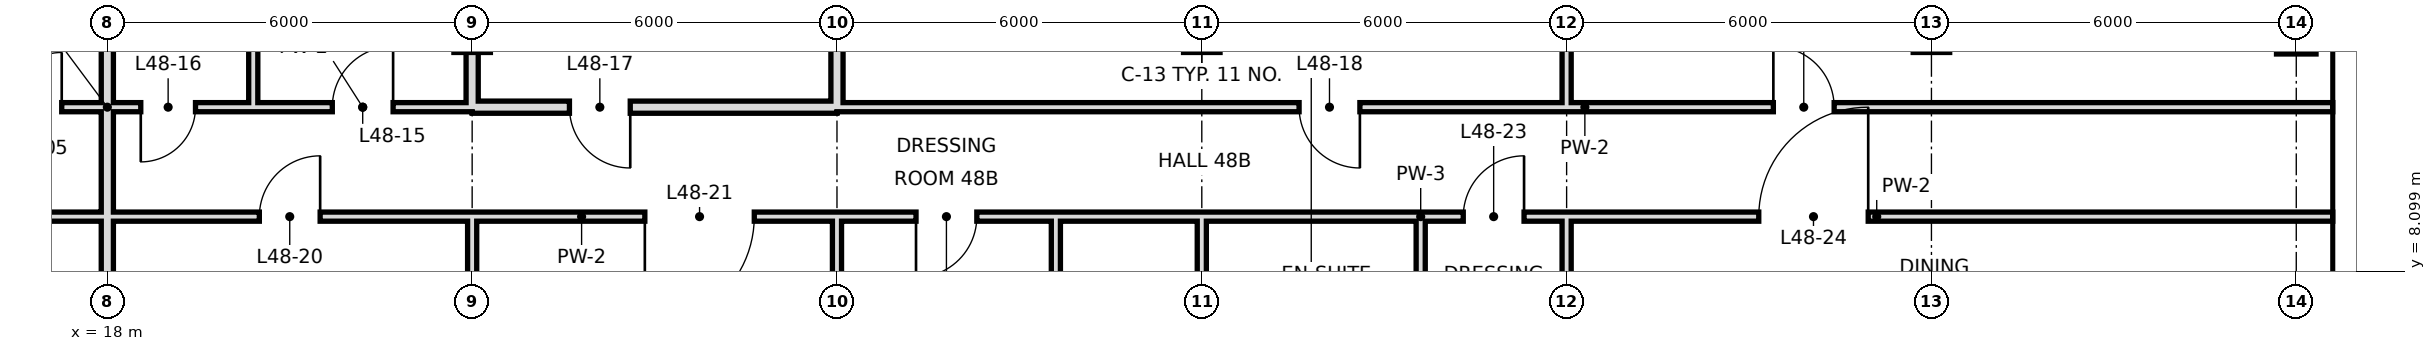
"""IFC4 building model, lengths in metres.
Left out: names, types, materials, properties, quantities, classifications, styles, units other than length and angle.
Written with IfcOpenShell. Run it as: python <this file> out.ifc"""

import sys

from ifc_helpers import new_model, si_unit, direction, frame, frame_2d, origin, origin_2d, place, context, subcontext, project, spatial, rectangle, hollow_rectangle, extrude, element, fill, save


model = new_model("IFC4")
c1 = context("Model", 3, precision=1e-05, world=origin(), true_north=direction((0.0, 1.0)))
c2 = subcontext(c1, "Body", "Model", "MODEL_VIEW")
j1 = project(units=[si_unit("LENGTHUNIT", "METRE"), si_unit("PLANEANGLEUNIT", "RADIAN")], contexts=[c1])
p1 = place(None, origin())
s1 = spatial("IfcSite", under=j1, at=p1, CompositionType="ELEMENT")
p2 = place(p1, origin())
s2 = spatial("IfcBuilding", under=s1, at=p2, CompositionType="ELEMENT")
p3 = place(p2, frame((0.0, 0.0, 206.4)))
s3 = spatial("IfcBuildingStorey", under=s2, at=p3, CompositionType="ELEMENT", Elevation=206.4)
p4 = place(p3, frame((54.0, 12.0, 0.0), z_axis=(0.0, 0.0, 1.0), x_axis=(1.0, 0.0, 0.0)))
e1 = element("IfcColumn", 1, at=p4, inside=s3, PredefinedType="COLUMN", context=c2, shape_type="SweptSolid", body=[
    extrude(hollow_rectangle(XDim=0.65, YDim=0.65, WallThickness=0.032, at=origin_2d()), origin(), (0.0, 0.0, 1.0), 3.6),
])
p5 = place(p3, frame((18.0, -0.6, 0.0), z_axis=(0.0, 0.0, 1.0), x_axis=(0.0, 1.0, 0.0)))
e2 = element("IfcWall", 2, at=p5, inside=s3, PredefinedType="SOLIDWALL", context=c2, shape_type="SweptSolid", body=[
    extrude(rectangle(XDim=15.9, YDim=0.2, at=frame_2d((7.95, 0.0))), origin(), (0.0, 0.0, 1.0), 2.68),
])
p6 = place(p3, frame((20.4, 10.8, 0.0), z_axis=(0.0, 0.0, 1.0), x_axis=(0.0, 1.0, 0.0)))
e3 = element("IfcWall", 3, at=p6, inside=s3, PredefinedType="PARTITIONING", context=c2, shape_type="SweptSolid", body=[
    extrude(rectangle(XDim=4.5, YDim=0.15, at=frame_2d((2.25, 0.0))), origin(), (0.0, 0.0, 1.0), 3.38),
])
p7 = place(p3, frame((24.0, 10.8, 0.0), z_axis=(0.0, 0.0, 1.0), x_axis=(0.0, 1.0, 0.0)))
e4 = element("IfcWall", 4, at=p7, inside=s3, PredefinedType="SOLIDWALL", context=c2, shape_type="SweptSolid", body=[
    extrude(rectangle(XDim=4.5, YDim=0.2, at=frame_2d((2.25, 0.0))), origin(), (0.0, 0.0, 1.0), 2.68),
])
p8 = place(p3, frame((24.0, 0.0, 0.0), z_axis=(0.0, 0.0, 1.0), x_axis=(0.0, 1.0, 0.0)))
e5 = element("IfcWall", 5, at=p8, inside=s3, PredefinedType="PARTITIONING", context=c2, shape_type="SweptSolid", body=[
    extrude(rectangle(XDim=9.0, YDim=0.15, at=frame_2d((4.5, 0.0))), origin(), (0.0, 0.0, 1.0), 2.68),
])
p9 = place(p3, frame((30.0, 10.8, 0.0), z_axis=(0.0, 0.0, 1.0), x_axis=(0.0, 1.0, 0.0)))
e6 = element("IfcWall", 6, at=p9, inside=s3, PredefinedType="SOLIDWALL", context=c2, shape_type="SweptSolid", body=[
    extrude(rectangle(XDim=4.5, YDim=0.2, at=frame_2d((2.25, 0.0))), origin(), (0.0, 0.0, 1.0), 2.68),
])
p10 = place(p3, frame((30.0, -0.6, 0.0), z_axis=(0.0, 0.0, 1.0), x_axis=(0.0, 1.0, 0.0)))
e7 = element("IfcWall", 7, at=p10, inside=s3, PredefinedType="PARTITIONING", context=c2, shape_type="SweptSolid", body=[
    extrude(rectangle(XDim=9.6, YDim=0.15, at=frame_2d((4.8, 0.0))), origin(), (0.0, 0.0, 1.0), 2.68),
])
p11 = place(p3, frame((33.6, 6.0, 0.0), z_axis=(0.0, 0.0, 1.0), x_axis=(0.0, 1.0, 0.0)))
e8 = element("IfcWall", 8, at=p11, inside=s3, PredefinedType="PARTITIONING", context=c2, shape_type="SweptSolid", body=[
    extrude(rectangle(XDim=3.0, YDim=0.15, at=frame_2d((1.5, 0.0))), origin(), (0.0, 0.0, 1.0), 3.38),
])
p12 = place(p3, frame((36.0, 6.0, 0.0), z_axis=(0.0, 0.0, 1.0), x_axis=(0.0, 1.0, 0.0)))
e9 = element("IfcWall", 9, at=p12, inside=s3, PredefinedType="PARTITIONING", context=c2, shape_type="SweptSolid", body=[
    extrude(rectangle(XDim=3.0, YDim=0.15, at=frame_2d((1.5, 0.0))), origin(), (0.0, 0.0, 1.0), 2.68),
])
p13 = place(p3, frame((39.6, 6.0, 0.0), z_axis=(0.0, 0.0, 1.0), x_axis=(0.0, 1.0, 0.0)))
e10 = element("IfcWall", 10, at=p13, inside=s3, PredefinedType="PARTITIONING", context=c2, shape_type="SweptSolid", body=[
    extrude(rectangle(XDim=3.0, YDim=0.15, at=frame_2d((1.5, 0.0))), origin(), (0.0, 0.0, 1.0), 3.38),
])
p14 = place(p3, frame((42.0, -0.6, 0.0), z_axis=(0.0, 0.0, 1.0), x_axis=(0.0, 1.0, 0.0)))
e11 = element("IfcWall", 11, at=p14, inside=s3, PredefinedType="PARTITIONING", context=c2, shape_type="SweptSolid", body=[
    extrude(rectangle(XDim=9.6, YDim=0.15, at=frame_2d((4.8, 0.0))), origin(), (0.0, 0.0, 1.0), 2.68),
])
p15 = place(p3, frame((42.0, 10.8, 0.0), z_axis=(0.0, 0.0, 1.0), x_axis=(0.0, 1.0, 0.0)))
e12 = element("IfcWall", 12, at=p15, inside=s3, PredefinedType="PARTITIONING", context=c2, shape_type="SweptSolid", body=[
    extrude(rectangle(XDim=4.5, YDim=0.15, at=frame_2d((2.25, 0.0))), origin(), (0.0, 0.0, 1.0), 2.68),
])
p16 = place(p3, frame((24.0, 10.8, 0.0), z_axis=(0.0, 0.0, 1.0), x_axis=(1.0, 0.0, 0.0)))
e13 = element("IfcWall", 13, at=p16, inside=s3, PredefinedType="SOLIDWALL", context=c2, shape_type="SweptSolid", body=[
    extrude(rectangle(XDim=6.0, YDim=0.2, at=frame_2d((3.0, 0.0))), origin(), (0.0, 0.0, 1.0), 2.68),
])
p17 = place(p16, frame((1.6, 0.0, 0.0)))
e14 = element("IfcOpeningElement", 14, at=p17, cuts=e13, PredefinedType="OPENING", context=c2, shape_type="SweptSolid", body=[
    extrude(rectangle(XDim=1.0, YDim=2.4, at=frame_2d((0.5, 1.2))), frame((0.0, 0.11, 0.0), z_axis=(0.0, -1.0, 0.0), x_axis=(1.0, 0.0, 0.0)), (0.0, 0.0, 1.0), 0.22),
])
p18 = place(p3, frame((20.4, 10.8, 0.0), z_axis=(0.0, 0.0, 1.0), x_axis=(1.0, 0.0, 0.0)))
e15 = element("IfcWall", 15, at=p18, inside=s3, PredefinedType="PARTITIONING", context=c2, shape_type="SweptSolid", body=[
    extrude(rectangle(XDim=3.6, YDim=0.15, at=frame_2d((1.8, 0.0))), origin(), (0.0, 0.0, 1.0), 3.38),
])
p19 = place(p18, frame((1.3, 0.0, 0.0)))
e16 = element("IfcOpeningElement", 16, at=p19, cuts=e15, PredefinedType="OPENING", context=c2, shape_type="SweptSolid", body=[
    extrude(rectangle(XDim=1.0, YDim=2.4, at=frame_2d((0.5, 1.2))), frame((0.0, 0.085, 0.0), z_axis=(0.0, -1.0, 0.0), x_axis=(1.0, 0.0, 0.0)), (0.0, 0.0, 1.0), 0.17),
])
p20 = place(p3, frame((30.0, 10.8, 0.0), z_axis=(0.0, 0.0, 1.0), x_axis=(1.0, 0.0, 0.0)))
e17 = element("IfcWall", 17, at=p20, inside=s3, PredefinedType="PARTITIONING", context=c2, shape_type="SweptSolid", body=[
    extrude(rectangle(XDim=24.6, YDim=0.15, at=frame_2d((12.3, 0.0))), origin(), (0.0, 0.0, 1.0), 3.38),
])
p21 = place(p20, frame((7.6, 0.0, 0.0)))
e18 = element("IfcOpeningElement", 18, at=p21, cuts=e17, PredefinedType="OPENING", context=c2, shape_type="SweptSolid", body=[
    extrude(rectangle(XDim=1.0, YDim=2.4, at=frame_2d((0.5, 1.2))), frame((0.0, 0.085, 0.0), z_axis=(0.0, -1.0, 0.0), x_axis=(1.0, 0.0, 0.0)), (0.0, 0.0, 1.0), 0.17),
])
p22 = place(p20, frame((15.4, 0.0, 0.0)))
e19 = element("IfcOpeningElement", 19, at=p22, cuts=e17, PredefinedType="OPENING", context=c2, shape_type="SweptSolid", body=[
    extrude(rectangle(XDim=1.0, YDim=2.4, at=frame_2d((0.5, 1.2))), frame((0.0, 0.085, 0.0), z_axis=(0.0, -1.0, 0.0), x_axis=(1.0, 0.0, 0.0)), (0.0, 0.0, 1.0), 0.17),
])
p23 = place(p3, frame((15.6, 10.8, 0.0), z_axis=(0.0, 0.0, 1.0), x_axis=(1.0, 0.0, 0.0)))
e20 = element("IfcWall", 20, at=p23, inside=s3, PredefinedType="PARTITIONING", context=c2, shape_type="SweptSolid", body=[
    extrude(rectangle(XDim=4.8, YDim=0.15, at=frame_2d((2.4, 0.0))), origin(), (0.0, 0.0, 1.0), 3.38),
])
p24 = place(p23, frame((0.75, 0.0, 0.0)))
e21 = element("IfcOpeningElement", 21, at=p24, cuts=e20, PredefinedType="OPENING", context=c2, shape_type="SweptSolid", body=[
    extrude(rectangle(XDim=0.9, YDim=2.4, at=frame_2d((0.45, 1.2))), frame((0.0, 0.085, 0.0), z_axis=(0.0, -1.0, 0.0), x_axis=(1.0, 0.0, 0.0)), (0.0, 0.0, 1.0), 0.17),
])
p25 = place(p23, frame((2.95, 0.0, 0.0)))
e22 = element("IfcOpeningElement", 22, at=p25, cuts=e20, PredefinedType="OPENING", context=c2, shape_type="SweptSolid", body=[
    extrude(rectangle(XDim=0.9, YDim=2.4, at=frame_2d((0.45, 1.2))), frame((0.0, 0.085, 0.0), z_axis=(0.0, -1.0, 0.0), x_axis=(1.0, 0.0, 0.0)), (0.0, 0.0, 1.0), 0.17),
])
p26 = place(p3, frame((18.0, 9.0, 0.0), z_axis=(0.0, 0.0, 1.0), x_axis=(1.0, 0.0, 0.0)))
e23 = element("IfcWall", 23, at=p26, inside=s3, PredefinedType="PARTITIONING", context=c2, shape_type="SweptSolid", body=[
    extrude(rectangle(XDim=15.6, YDim=0.15, at=frame_2d((7.8, 0.0))), origin(), (0.0, 0.0, 1.0), 3.38),
])
p27 = place(p26, frame((2.5, 0.0, 0.0)))
e24 = element("IfcOpeningElement", 24, at=p27, cuts=e23, PredefinedType="OPENING", context=c2, shape_type="SweptSolid", body=[
    extrude(rectangle(XDim=1.0, YDim=2.4, at=frame_2d((0.5, 1.2))), frame((0.0, 0.085, 0.0), z_axis=(0.0, -1.0, 0.0), x_axis=(1.0, 0.0, 0.0)), (0.0, 0.0, 1.0), 0.17),
])
p28 = place(p26, frame((8.84, 0.0, 0.0)))
e25 = element("IfcOpeningElement", 25, at=p28, cuts=e23, PredefinedType="OPENING", context=c2, shape_type="SweptSolid", body=[
    extrude(rectangle(XDim=1.8, YDim=2.4, at=frame_2d((0.9, 1.2))), frame((0.0, 0.085, 0.0), z_axis=(0.0, -1.0, 0.0), x_axis=(1.0, 0.0, 0.0)), (0.0, 0.0, 1.0), 0.17),
])
p29 = place(p26, frame((13.3, 0.0, 0.0)))
e26 = element("IfcOpeningElement", 26, at=p29, cuts=e23, PredefinedType="OPENING", context=c2, shape_type="SweptSolid", body=[
    extrude(rectangle(XDim=1.0, YDim=2.4, at=frame_2d((0.5, 1.2))), frame((0.0, 0.085, 0.0), z_axis=(0.0, -1.0, 0.0), x_axis=(1.0, 0.0, 0.0)), (0.0, 0.0, 1.0), 0.17),
])
p30 = place(p3, frame((39.6, 9.0, 0.0), z_axis=(0.0, 0.0, 1.0), x_axis=(1.0, 0.0, 0.0)))
e27 = element("IfcWall", 27, at=p30, inside=s3, PredefinedType="PARTITIONING", context=c2, shape_type="SweptSolid", body=[
    extrude(rectangle(XDim=15.0, YDim=0.15, at=frame_2d((7.5, 0.0))), origin(), (0.0, 0.0, 1.0), 3.38),
])
p31 = place(p30, frame((0.7, 0.0, 0.0)))
e28 = element("IfcOpeningElement", 28, at=p31, cuts=e27, PredefinedType="OPENING", context=c2, shape_type="SweptSolid", body=[
    extrude(rectangle(XDim=1.0, YDim=2.4, at=frame_2d((0.5, 1.2))), frame((0.0, 0.085, 0.0), z_axis=(0.0, -1.0, 0.0), x_axis=(1.0, 0.0, 0.0)), (0.0, 0.0, 1.0), 0.17),
])
p32 = place(p30, frame((5.56, 0.0, 0.0)))
e29 = element("IfcOpeningElement", 29, at=p32, cuts=e27, PredefinedType="OPENING", context=c2, shape_type="SweptSolid", body=[
    extrude(rectangle(XDim=1.8, YDim=2.4, at=frame_2d((0.9, 1.2))), frame((0.0, 0.085, 0.0), z_axis=(0.0, -1.0, 0.0), x_axis=(1.0, 0.0, 0.0)), (0.0, 0.0, 1.0), 0.17),
])
p33 = place(p3, frame((14.4, 9.0, 0.0), z_axis=(0.0, 0.0, 1.0), x_axis=(1.0, 0.0, 0.0)))
e30 = element("IfcWall", 30, at=p33, inside=s3, PredefinedType="PARTITIONING", context=c2, shape_type="SweptSolid", body=[
    extrude(rectangle(XDim=3.6, YDim=0.15, at=frame_2d((1.8, 0.0))), origin(), (0.0, 0.0, 1.0), 3.38),
])
p34 = place(p3, frame((33.6, 9.0, 0.0), z_axis=(0.0, 0.0, 1.0), x_axis=(1.0, 0.0, 0.0)))
e31 = element("IfcWall", 31, at=p34, inside=s3, PredefinedType="PARTITIONING", context=c2, shape_type="SweptSolid", body=[
    extrude(rectangle(XDim=6.0, YDim=0.15, at=frame_2d((3.0, 0.0))), origin(), (0.0, 0.0, 1.0), 3.38),
])
p35 = place(p24, frame((0.9, 0.0, 0.0), z_axis=(0.0, 0.0, 1.0), x_axis=(-1.0, 0.0, 0.0)))
e32 = element("IfcDoor", 32, at=p35, inside=s3, OperationType="SINGLE_SWING_LEFT", PredefinedType="DOOR", context=c2, shape_type="SweptSolid", body=[
    extrude(rectangle(XDim=0.9, YDim=2.4, at=frame_2d((0.45, 1.2))), frame((0.0, 0.025, 0.0), z_axis=(0.0, -1.0, 0.0), x_axis=(1.0, 0.0, 0.0)), (0.0, 0.0, 1.0), 0.05),
])
fill(e21, e32)
p36 = place(p19, frame((1.0, 0.0, 0.0), z_axis=(0.0, 0.0, 1.0), x_axis=(-1.0, 0.0, 0.0)))
e33 = element("IfcDoor", 33, at=p36, inside=s3, OperationType="SINGLE_SWING_LEFT", PredefinedType="DOOR", context=c2, shape_type="SweptSolid", body=[
    extrude(rectangle(XDim=1.0, YDim=2.4, at=frame_2d((0.5, 1.2))), frame((0.0, 0.025, 0.0), z_axis=(0.0, -1.0, 0.0), x_axis=(1.0, 0.0, 0.0)), (0.0, 0.0, 1.0), 0.05),
])
fill(e16, e33)
p37 = place(p25, frame((0.9, 0.0, 0.0), z_axis=(0.0, 0.0, 1.0), x_axis=(-1.0, 0.0, 0.0)))
e34 = element("IfcDoor", 34, at=p37, inside=s3, OperationType="SINGLE_SWING_RIGHT", PredefinedType="DOOR", context=c2, shape_type="SweptSolid", body=[
    extrude(rectangle(XDim=0.9, YDim=2.4, at=frame_2d((0.45, 1.2))), frame((0.0, 0.025, 0.0), z_axis=(0.0, -1.0, 0.0), x_axis=(1.0, 0.0, 0.0)), (0.0, 0.0, 1.0), 0.05),
])
fill(e22, e34)
p38 = place(p17, origin())
e35 = element("IfcDoor", 35, at=p38, inside=s3, OperationType="SINGLE_SWING_RIGHT", PredefinedType="DOOR", context=c2, shape_type="SweptSolid", body=[
    extrude(rectangle(XDim=1.0, YDim=2.4, at=frame_2d((0.5, 1.2))), frame((0.0, 0.025, 0.0), z_axis=(0.0, -1.0, 0.0), x_axis=(1.0, 0.0, 0.0)), (0.0, 0.0, 1.0), 0.05),
])
fill(e14, e35)
p39 = place(p21, origin())
e36 = element("IfcDoor", 36, at=p39, inside=s3, OperationType="SINGLE_SWING_RIGHT", PredefinedType="DOOR", context=c2, shape_type="SweptSolid", body=[
    extrude(rectangle(XDim=1.0, YDim=2.4, at=frame_2d((0.5, 1.2))), frame((0.0, 0.025, 0.0), z_axis=(0.0, -1.0, 0.0), x_axis=(1.0, 0.0, 0.0)), (0.0, 0.0, 1.0), 0.05),
])
fill(e18, e36)
p40 = place(p22, origin())
e37 = element("IfcDoor", 37, at=p40, inside=s3, OperationType="SINGLE_SWING_LEFT", PredefinedType="DOOR", context=c2, shape_type="SweptSolid", body=[
    extrude(rectangle(XDim=1.0, YDim=2.4, at=frame_2d((0.5, 1.2))), frame((0.0, 0.025, 0.0), z_axis=(0.0, -1.0, 0.0), x_axis=(1.0, 0.0, 0.0)), (0.0, 0.0, 1.0), 0.05),
])
fill(e19, e37)
p41 = place(p27, frame((1.0, 0.0, 0.0), z_axis=(0.0, 0.0, 1.0), x_axis=(-1.0, 0.0, 0.0)))
e38 = element("IfcDoor", 38, at=p41, inside=s3, OperationType="SINGLE_SWING_LEFT", PredefinedType="DOOR", context=c2, shape_type="SweptSolid", body=[
    extrude(rectangle(XDim=1.0, YDim=2.4, at=frame_2d((0.5, 1.2))), frame((0.0, 0.025, 0.0), z_axis=(0.0, -1.0, 0.0), x_axis=(1.0, 0.0, 0.0)), (0.0, 0.0, 1.0), 0.05),
])
fill(e24, e38)
p42 = place(p28, frame((1.8, 0.0, 0.0), z_axis=(0.0, 0.0, 1.0), x_axis=(-1.0, 0.0, 0.0)))
e39 = element("IfcDoor", 39, at=p42, inside=s3, OperationType="SINGLE_SWING_RIGHT", PredefinedType="DOOR", context=c2, shape_type="SweptSolid", body=[
    extrude(rectangle(XDim=1.8, YDim=2.4, at=frame_2d((0.9, 1.2))), frame((0.0, 0.025, 0.0), z_axis=(0.0, -1.0, 0.0), x_axis=(1.0, 0.0, 0.0)), (0.0, 0.0, 1.0), 0.05),
])
fill(e25, e39)
p43 = place(p29, frame((1.0, 0.0, 0.0), z_axis=(0.0, 0.0, 1.0), x_axis=(-1.0, 0.0, 0.0)))
e40 = element("IfcDoor", 40, at=p43, inside=s3, OperationType="SINGLE_SWING_RIGHT", PredefinedType="DOOR", context=c2, shape_type="SweptSolid", body=[
    extrude(rectangle(XDim=1.0, YDim=2.4, at=frame_2d((0.5, 1.2))), frame((0.0, 0.025, 0.0), z_axis=(0.0, -1.0, 0.0), x_axis=(1.0, 0.0, 0.0)), (0.0, 0.0, 1.0), 0.05),
])
fill(e26, e40)
p44 = place(p31, frame((1.0, 0.0, 0.0), z_axis=(0.0, 0.0, 1.0), x_axis=(-1.0, 0.0, 0.0)))
e41 = element("IfcDoor", 41, at=p44, inside=s3, OperationType="SINGLE_SWING_LEFT", PredefinedType="DOOR", context=c2, shape_type="SweptSolid", body=[
    extrude(rectangle(XDim=1.0, YDim=2.4, at=frame_2d((0.5, 1.2))), frame((0.0, 0.025, 0.0), z_axis=(0.0, -1.0, 0.0), x_axis=(1.0, 0.0, 0.0)), (0.0, 0.0, 1.0), 0.05),
])
fill(e28, e41)
p45 = place(p32, frame((1.8, 0.0, 0.0), z_axis=(0.0, 0.0, 1.0), x_axis=(-1.0, 0.0, 0.0)))
e42 = element("IfcDoor", 42, at=p45, inside=s3, OperationType="SINGLE_SWING_LEFT", PredefinedType="DOOR", context=c2, shape_type="SweptSolid", body=[
    extrude(rectangle(XDim=1.8, YDim=2.4, at=frame_2d((0.9, 1.2))), frame((0.0, 0.025, 0.0), z_axis=(0.0, -1.0, 0.0), x_axis=(1.0, 0.0, 0.0)), (0.0, 0.0, 1.0), 0.05),
])
fill(e29, e42)
save(model, sys.argv[1])
